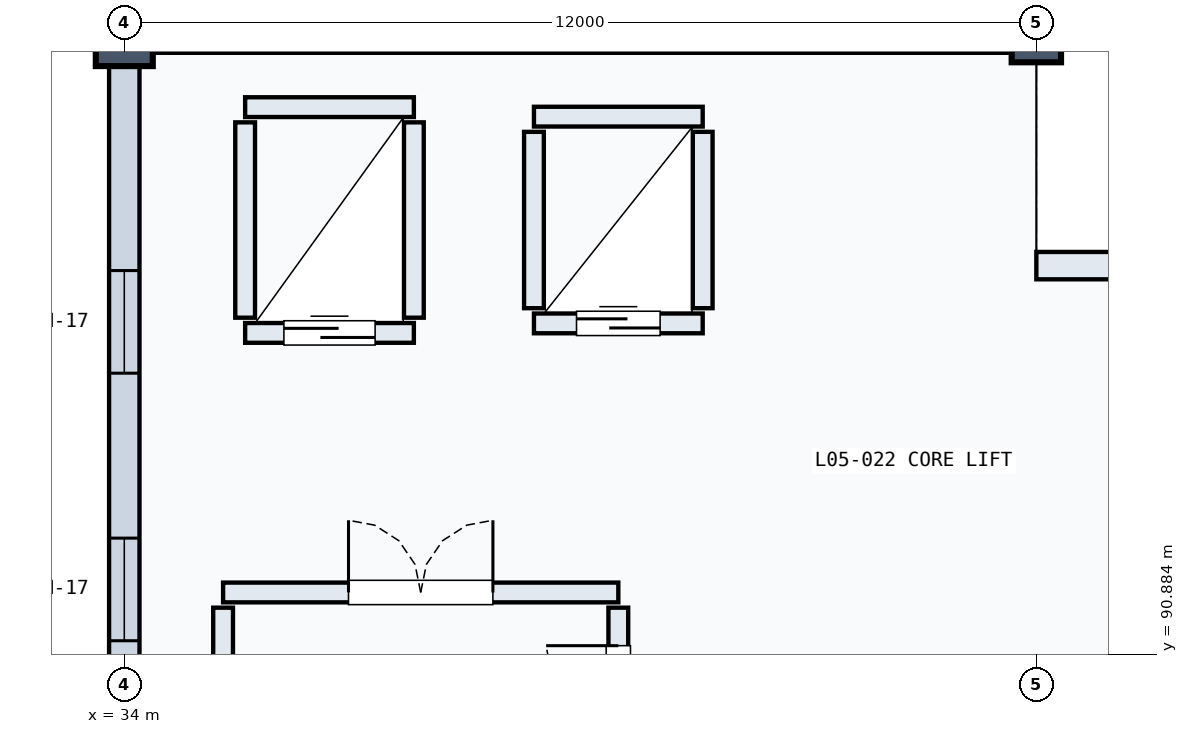
"""IFC4 building model, lengths in metres.
Left out: names, types, materials, properties, quantities, classifications, styles, units other than length and angle.
Written with IfcOpenShell. Run it as: python <this file> out.ifc"""

import sys

from ifc_helpers import new_model, si_unit, direction, frame, frame_2d, origin, origin_2d, place, context, subcontext, project, spatial, rectangle, circle, extrude, element, fill, save


model = new_model("IFC4")
c1 = context("Model", 3, precision=1e-05, world=origin(), true_north=direction((0.0, 1.0)))
c2 = subcontext(c1, "Body", "Model", "MODEL_VIEW")
j1 = project(units=[si_unit("LENGTHUNIT", "METRE"), si_unit("PLANEANGLEUNIT", "RADIAN")], contexts=[c1])
p1 = place(None, origin())
s1 = spatial("IfcSite", under=j1, at=p1, CompositionType="ELEMENT")
p2 = place(p1, origin())
s2 = spatial("IfcBuilding", under=s1, at=p2, CompositionType="ELEMENT")
p3 = place(p2, frame((0.0, 0.0, 24.3)))
s3 = spatial("IfcBuildingStorey", under=s2, at=p3, CompositionType="ELEMENT", Elevation=24.3)
p4 = place(p3, frame((34.0, 99.0, 0.0), z_axis=(0.0, 0.0, 1.0), x_axis=(1.0, 0.0, 0.0)))
e1 = element("IfcColumn", 1, at=p4, inside=s3, PredefinedType="COLUMN", context=c2, shape_type="SweptSolid", body=[
    extrude(circle(Radius=0.375, at=origin_2d()), origin(), (0.0, 0.0, 1.0), 5.4),
])
p5 = place(p3, frame((46.0, 99.0, 0.0), z_axis=(0.0, 0.0, 1.0), x_axis=(1.0, 0.0, 0.0)))
e2 = element("IfcColumn", 2, at=p5, inside=s3, PredefinedType="COLUMN", context=c2, shape_type="SweptSolid", body=[
    extrude(circle(Radius=0.325, at=origin_2d()), origin(), (0.0, 0.0, 1.0), 5.4),
])
p6 = place(p3, frame((34.22, 99.0, 0.0), z_axis=(0.0, 0.0, 1.0), x_axis=(1.0, 0.0, 0.0)))
e3 = element("IfcWall", 3, at=p6, inside=s3, PredefinedType="SOLIDWALL", context=c2, shape_type="SweptSolid", body=[
    extrude(rectangle(XDim=11.56, YDim=0.4, at=frame_2d((5.78, 0.0))), origin(), (0.0, 0.0, 1.0), 5.185),
])
p7 = place(p6, frame((3.178, 0.0, 0.8)))
e4 = element("IfcOpeningElement", 4, at=p7, cuts=e3, PredefinedType="OPENING", context=c2, shape_type="SweptSolid", body=[
    extrude(rectangle(XDim=1.35, YDim=2.1, at=frame_2d((0.675, 1.05))), frame((0.0, 0.21, 0.0), z_axis=(0.0, -1.0, 0.0), x_axis=(1.0, 0.0, 0.0)), (0.0, 0.0, 1.0), 0.42),
])
p8 = place(p6, frame((7.032, 0.0, 0.8)))
e5 = element("IfcOpeningElement", 5, at=p8, cuts=e3, PredefinedType="OPENING", context=c2, shape_type="SweptSolid", body=[
    extrude(rectangle(XDim=1.35, YDim=2.1, at=frame_2d((0.675, 1.05))), frame((0.0, 0.21, 0.0), z_axis=(0.0, -1.0, 0.0), x_axis=(1.0, 0.0, 0.0)), (0.0, 0.0, 1.0), 0.42),
])
p9 = place(p3, frame((34.0, 88.22, 0.0), z_axis=(0.0, 0.0, 1.0), x_axis=(0.0, 1.0, 0.0)))
e6 = element("IfcWall", 6, at=p9, inside=s3, PredefinedType="SOLIDWALL", context=c2, shape_type="SweptSolid", body=[
    extrude(rectangle(XDim=10.56, YDim=0.4, at=frame_2d((5.28, 0.0))), origin(), (0.0, 0.0, 1.0), 5.185),
])
p10 = place(p9, frame((2.845, 0.0, 0.8)))
e7 = element("IfcOpeningElement", 7, at=p10, cuts=e6, PredefinedType="OPENING", context=c2, shape_type="SweptSolid", body=[
    extrude(rectangle(XDim=1.35, YDim=2.1, at=frame_2d((0.675, 1.05))), frame((0.0, 0.21, 0.0), z_axis=(0.0, -1.0, 0.0), x_axis=(1.0, 0.0, 0.0)), (0.0, 0.0, 1.0), 0.42),
])
p11 = place(p9, frame((6.365, 0.0, 0.8)))
e8 = element("IfcOpeningElement", 8, at=p11, cuts=e6, PredefinedType="OPENING", context=c2, shape_type="SweptSolid", body=[
    extrude(rectangle(XDim=1.35, YDim=2.1, at=frame_2d((0.675, 1.05))), frame((0.0, 0.21, 0.0), z_axis=(0.0, -1.0, 0.0), x_axis=(1.0, 0.0, 0.0)), (0.0, 0.0, 1.0), 0.42),
])
p12 = place(p3, frame((46.0, 96.0, 0.0), z_axis=(0.0, 0.0, 1.0), x_axis=(1.0, 0.0, 0.0)))
e9 = element("IfcWall", 9, at=p12, inside=s3, PredefinedType="SOLIDWALL", context=c2, shape_type="SweptSolid", body=[
    extrude(rectangle(XDim=12.0, YDim=0.36, at=frame_2d((6.0, 0.0))), origin(), (0.0, 0.0, 1.0), 5.185),
])
p13 = place(p12, frame((4.85, 0.0, 0.85)))
e10 = element("IfcOpeningElement", 10, at=p13, cuts=e9, PredefinedType="OPENING", context=c2, shape_type="SweptSolid", body=[
    extrude(rectangle(XDim=2.3, YDim=2.05, at=frame_2d((1.15, 1.025))), frame((0.0, 0.19, 0.0), z_axis=(0.0, -1.0, 0.0), x_axis=(1.0, 0.0, 0.0)), (0.0, 0.0, 1.0), 0.38),
])
p14 = place(p3, frame((35.59, 95.115, 0.0), z_axis=(0.0, 0.0, 1.0), x_axis=(1.0, 0.0, 0.0)))
e11 = element("IfcWall", 11, at=p14, inside=s3, PredefinedType="SOLIDWALL", context=c2, shape_type="SweptSolid", body=[
    extrude(rectangle(XDim=2.22, YDim=0.26, at=frame_2d((1.11, 0.0))), origin(), (0.0, 0.0, 1.0), 5.18),
])
p15 = place(p14, frame((0.51, 0.0, 0.0)))
e12 = element("IfcOpeningElement", 12, at=p15, cuts=e11, PredefinedType="OPENING", context=c2, shape_type="SweptSolid", body=[
    extrude(rectangle(XDim=1.2, YDim=2.2, at=frame_2d((0.6, 1.1))), frame((0.0, 0.14, 0.0), z_axis=(0.0, -1.0, 0.0), x_axis=(1.0, 0.0, 0.0)), (0.0, 0.0, 1.0), 0.28),
])
p16 = place(p3, frame((35.59, 98.085, 0.0), z_axis=(0.0, 0.0, 1.0), x_axis=(1.0, 0.0, 0.0)))
e13 = element("IfcWall", 13, at=p16, inside=s3, PredefinedType="SOLIDWALL", context=c2, shape_type="SweptSolid", body=[
    extrude(rectangle(XDim=2.22, YDim=0.26, at=frame_2d((1.11, 0.0))), origin(), (0.0, 0.0, 1.0), 5.18),
])
for number, where, z_axis, x_axis in (
    (14, (35.59, 95.315, 0.0), (0.0, 0.0, 1.0), (0.0, 1.0, 0.0)),
    (15, (37.81, 95.315, 0.0), (0.0, 0.0, 1.0), (0.0, 1.0, 0.0)),
):
    element("IfcWall", number, at=place(p3, frame(where, z_axis=z_axis, x_axis=x_axis)), inside=s3, PredefinedType="SOLIDWALL", context=c2, shape_type="SweptSolid", body=[
        extrude(rectangle(XDim=2.57, YDim=0.26, at=frame_2d((1.285, 0.0))), origin(), (0.0, 0.0, 1.0), 5.18),
    ])
p17 = place(p3, frame((39.39, 95.24, 0.0), z_axis=(0.0, 0.0, 1.0), x_axis=(1.0, 0.0, 0.0)))
e16 = element("IfcWall", 16, at=p17, inside=s3, PredefinedType="SOLIDWALL", context=c2, shape_type="SweptSolid", body=[
    extrude(rectangle(XDim=2.22, YDim=0.26, at=frame_2d((1.11, 0.0))), origin(), (0.0, 0.0, 1.0), 5.18),
])
p18 = place(p17, frame((0.56, 0.0, 0.0)))
e17 = element("IfcOpeningElement", 17, at=p18, cuts=e16, PredefinedType="OPENING", context=c2, shape_type="SweptSolid", body=[
    extrude(rectangle(XDim=1.1, YDim=2.15, at=frame_2d((0.55, 1.075))), frame((0.0, 0.14, 0.0), z_axis=(0.0, -1.0, 0.0), x_axis=(1.0, 0.0, 0.0)), (0.0, 0.0, 1.0), 0.28),
])
p19 = place(p3, frame((39.39, 97.96, 0.0), z_axis=(0.0, 0.0, 1.0), x_axis=(1.0, 0.0, 0.0)))
e18 = element("IfcWall", 18, at=p19, inside=s3, PredefinedType="SOLIDWALL", context=c2, shape_type="SweptSolid", body=[
    extrude(rectangle(XDim=2.22, YDim=0.26, at=frame_2d((1.11, 0.0))), origin(), (0.0, 0.0, 1.0), 5.18),
])
for number, where, z_axis, x_axis in (
    (19, (39.39, 95.44, 0.0), (0.0, 0.0, 1.0), (0.0, 1.0, 0.0)),
    (20, (41.61, 95.44, 0.0), (0.0, 0.0, 1.0), (0.0, 1.0, 0.0)),
):
    element("IfcWall", number, at=place(p3, frame(where, z_axis=z_axis, x_axis=x_axis)), inside=s3, PredefinedType="SOLIDWALL", context=c2, shape_type="SweptSolid", body=[
        extrude(rectangle(XDim=2.32, YDim=0.26, at=frame_2d((1.16, 0.0))), origin(), (0.0, 0.0, 1.0), 5.18),
    ])
p20 = place(p3, frame((35.3, 91.7, 0.0), z_axis=(0.0, 0.0, 1.0), x_axis=(1.0, 0.0, 0.0)))
e21 = element("IfcWall", 21, at=p20, inside=s3, PredefinedType="SOLIDWALL", context=c2, shape_type="SweptSolid", body=[
    extrude(rectangle(XDim=5.2, YDim=0.26, at=frame_2d((2.6, 0.0))), origin(), (0.0, 0.0, 1.0), 5.18),
])
p21 = place(p20, frame((1.65, 0.0, 0.0)))
e22 = element("IfcOpeningElement", 22, at=p21, cuts=e21, PredefinedType="OPENING", context=c2, shape_type="SweptSolid", body=[
    extrude(rectangle(XDim=1.9, YDim=2.2, at=frame_2d((0.95, 1.1))), frame((0.0, 0.14, 0.0), z_axis=(0.0, -1.0, 0.0), x_axis=(1.0, 0.0, 0.0)), (0.0, 0.0, 1.0), 0.28),
])
p22 = place(p3, frame((35.3, 88.6, 0.0), z_axis=(0.0, 0.0, 1.0), x_axis=(0.0, 1.0, 0.0)))
e23 = element("IfcWall", 23, at=p22, inside=s3, PredefinedType="SOLIDWALL", context=c2, shape_type="SweptSolid", body=[
    extrude(rectangle(XDim=2.9, YDim=0.26, at=frame_2d((1.45, 0.0))), origin(), (0.0, 0.0, 1.0), 5.18),
])
p23 = place(p3, frame((40.5, 88.6, 0.0), z_axis=(0.0, 0.0, 1.0), x_axis=(0.0, 1.0, 0.0)))
e24 = element("IfcWall", 24, at=p23, inside=s3, PredefinedType="SOLIDWALL", context=c2, shape_type="SweptSolid", body=[
    extrude(rectangle(XDim=2.9, YDim=0.26, at=frame_2d((1.45, 0.0))), origin(), (0.0, 0.0, 1.0), 5.18),
])
p24 = place(p23, frame((0.5, 0.0, 0.0)))
e25 = element("IfcOpeningElement", 25, at=p24, cuts=e24, PredefinedType="OPENING", context=c2, shape_type="SweptSolid", body=[
    extrude(rectangle(XDim=1.9, YDim=2.2, at=frame_2d((0.95, 1.1))), frame((0.0, 0.14, 0.0), z_axis=(0.0, -1.0, 0.0), x_axis=(1.0, 0.0, 0.0)), (0.0, 0.0, 1.0), 0.28),
])
p25 = place(p10, origin())
e26 = element("IfcWindow", 26, at=p25, inside=s3, PartitioningType="SINGLE_PANEL", PredefinedType="WINDOW", context=c2, shape_type="SweptSolid", body=[
    extrude(rectangle(XDim=1.35, YDim=2.1, at=frame_2d((0.675, 1.05))), frame((0.0, 0.03, 0.0), z_axis=(0.0, -1.0, 0.0), x_axis=(1.0, 0.0, 0.0)), (0.0, 0.0, 1.0), 0.06),
])
fill(e7, e26)
p26 = place(p11, origin())
e27 = element("IfcWindow", 27, at=p26, inside=s3, PartitioningType="SINGLE_PANEL", PredefinedType="WINDOW", context=c2, shape_type="SweptSolid", body=[
    extrude(rectangle(XDim=1.35, YDim=2.1, at=frame_2d((0.675, 1.05))), frame((0.0, 0.03, 0.0), z_axis=(0.0, -1.0, 0.0), x_axis=(1.0, 0.0, 0.0)), (0.0, 0.0, 1.0), 0.06),
])
fill(e8, e27)
p27 = place(p15, origin())
e28 = element("IfcDoor", 28, at=p27, inside=s3, OperationType="SLIDING_TO_LEFT", PredefinedType="DOOR", context=c2, shape_type="SweptSolid", body=[
    extrude(rectangle(XDim=1.2, YDim=2.2, at=frame_2d((0.6, 1.1))), frame((0.0, 0.025, 0.0), z_axis=(0.0, -1.0, 0.0), x_axis=(1.0, 0.0, 0.0)), (0.0, 0.0, 1.0), 0.05),
])
fill(e12, e28)
p28 = place(p18, origin())
e29 = element("IfcDoor", 29, at=p28, inside=s3, OperationType="SLIDING_TO_LEFT", PredefinedType="DOOR", context=c2, shape_type="SweptSolid", body=[
    extrude(rectangle(XDim=1.1, YDim=2.15, at=frame_2d((0.55, 1.075))), frame((0.0, 0.025, 0.0), z_axis=(0.0, -1.0, 0.0), x_axis=(1.0, 0.0, 0.0)), (0.0, 0.0, 1.0), 0.05),
])
fill(e17, e29)
p29 = place(p21, origin())
e30 = element("IfcDoor", 30, at=p29, inside=s3, OperationType="DOUBLE_DOOR_SINGLE_SWING", PredefinedType="DOOR", context=c2, shape_type="SweptSolid", body=[
    extrude(rectangle(XDim=1.9, YDim=2.2, at=frame_2d((0.95, 1.1))), frame((0.0, 0.025, 0.0), z_axis=(0.0, -1.0, 0.0), x_axis=(1.0, 0.0, 0.0)), (0.0, 0.0, 1.0), 0.05),
])
fill(e22, e30)
p30 = place(p24, origin())
e31 = element("IfcDoor", 31, at=p30, inside=s3, OperationType="DOUBLE_DOOR_SINGLE_SWING", PredefinedType="DOOR", context=c2, shape_type="SweptSolid", body=[
    extrude(rectangle(XDim=1.9, YDim=2.2, at=frame_2d((0.95, 1.1))), frame((0.0, 0.025, 0.0), z_axis=(0.0, -1.0, 0.0), x_axis=(1.0, 0.0, 0.0)), (0.0, 0.0, 1.0), 0.05),
])
fill(e25, e31)
save(model, sys.argv[1])
